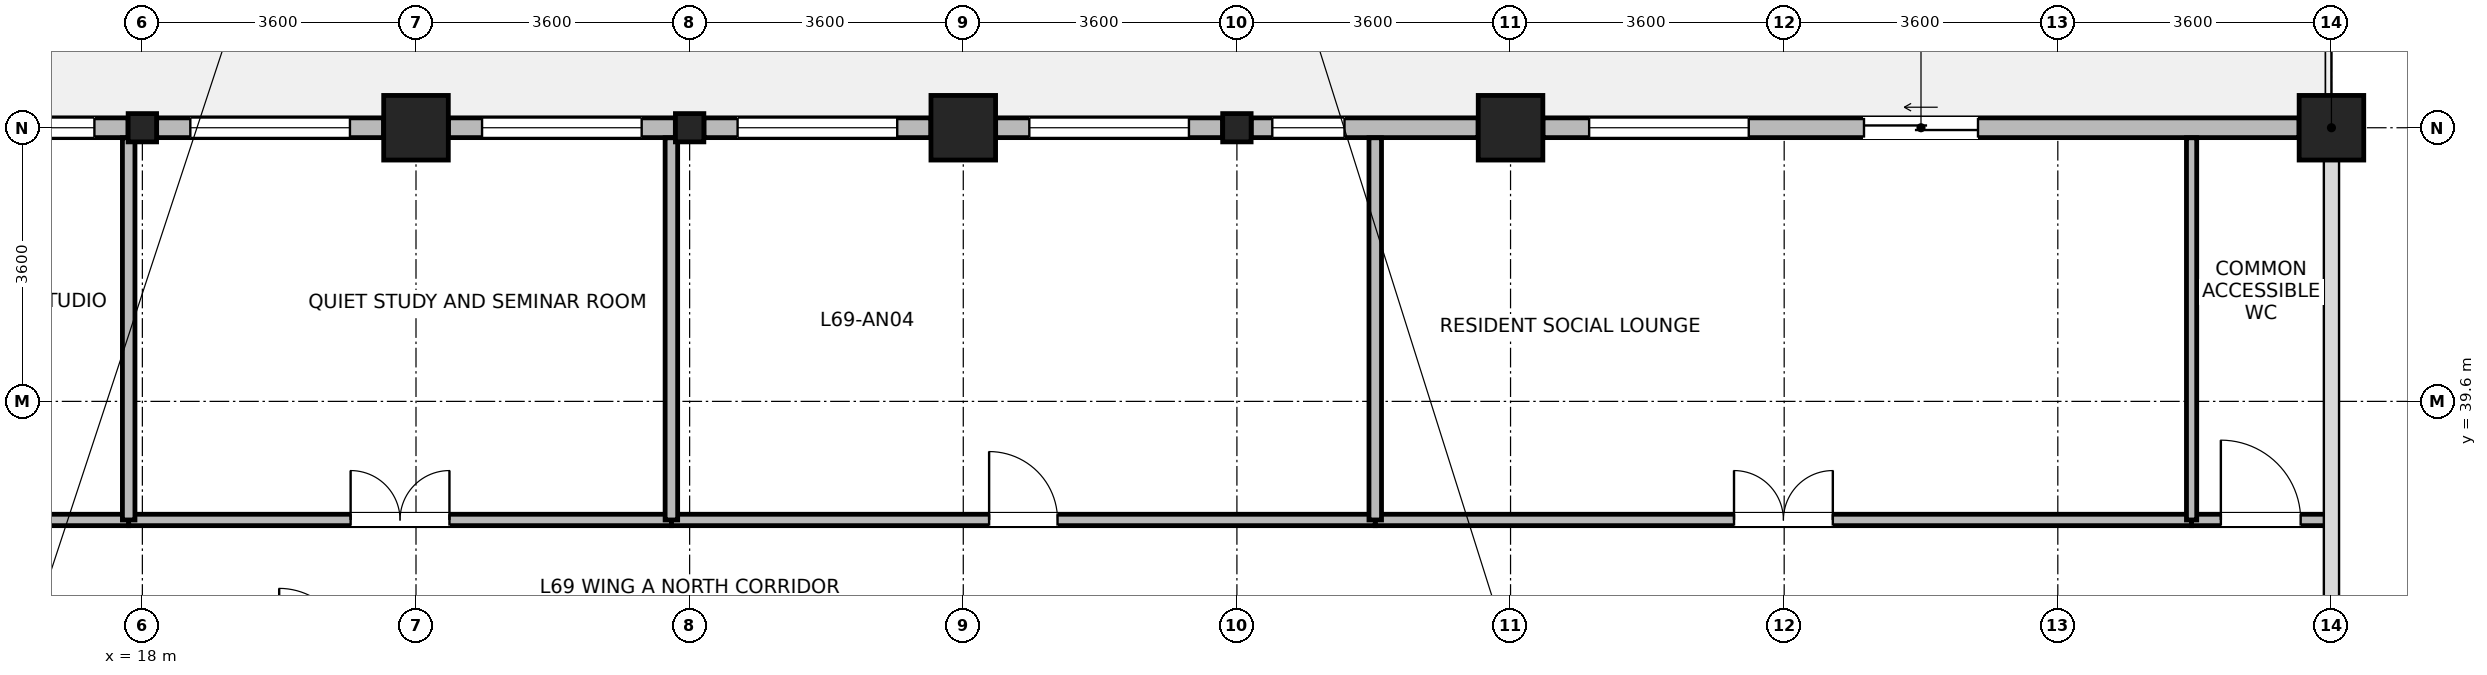
"""IFC4 building model, lengths in metres.
Left out: names, types, materials, properties, quantities, classifications, styles, units other than length and angle.
Written with IfcOpenShell. Run it as: python <this file> out.ifc"""

import sys

from ifc_helpers import new_model, si_unit, direction, frame, frame_2d, origin, origin_2d, place, context, subcontext, project, spatial, rectangle, i_section, extrude, source, transform, mapped, element, fill, save


model = new_model("IFC4")
c1 = context("Model", 3, precision=1e-05, world=origin(), true_north=direction((0.0, 1.0)))
c2 = subcontext(c1, "Body", "Model", "MODEL_VIEW")
j1 = project(units=[si_unit("LENGTHUNIT", "METRE"), si_unit("PLANEANGLEUNIT", "RADIAN")], contexts=[c1])
p1 = place(None, origin())
s1 = spatial("IfcSite", under=j1, at=p1, CompositionType="ELEMENT")
p2 = place(p1, origin())
s2 = spatial("IfcBuilding", under=s1, at=p2, CompositionType="ELEMENT")
p3 = place(p2, frame((0.0, 0.0, 268.4)))
s3 = spatial("IfcBuildingStorey", under=s2, at=p3, CompositionType="ELEMENT", Elevation=268.4)
m1 = source(origin(), c2, "Body", "SweptSolid", [
    extrude(rectangle(XDim=0.85, YDim=0.85, at=origin_2d()), origin(), (0.0, 0.0, 1.0), 3.7),
])
for number, where, z_axis, x_axis in (
    (1, (21.6, 43.2, 0.0), (0.0, 0.0, 1.0), (1.0, 0.0, 0.0)),
    (2, (28.8, 43.2, 0.0), (0.0, 0.0, 1.0), (1.0, 0.0, 0.0)),
    (3, (36.0, 43.2, 0.0), (0.0, 0.0, 1.0), (1.0, 0.0, 0.0)),
    (4, (46.8, 43.2, 0.0), (0.0, 0.0, 1.0), (1.0, 0.0, 0.0)),
):
    element("IfcColumn", number, at=place(p3, frame(where, z_axis=z_axis, x_axis=x_axis)), inside=s3, PredefinedType="COLUMN", context=c2, shape_type="MappedRepresentation", body=[
        mapped(m1, transform((0.0, 0.0, 0.0), x_axis=(1.0, 0.0, 0.0), y_axis=(0.0, 1.0, 0.0), z_axis=(0.0, 0.0, 1.0), scale=1.0)),
    ])
m2 = source(origin(), c2, "Body", "SweptSolid", [
    extrude(i_section(OverallWidth=0.374, OverallDepth=0.372, WebThickness=0.015, FlangeThickness=0.026, FilletRadius=0.015, at=origin_2d()), origin(), (0.0, 0.0, 1.0), 3.7),
])
for number, where, z_axis, x_axis in (
    (5, (18.0, 43.2, 0.0), (0.0, 0.0, 1.0), (1.0, 0.0, 0.0)),
    (6, (25.2, 43.2, 0.0), (0.0, 0.0, 1.0), (1.0, 0.0, 0.0)),
    (7, (32.4, 43.2, 0.0), (0.0, 0.0, 1.0), (1.0, 0.0, 0.0)),
):
    element("IfcColumn", number, at=place(p3, frame(where, z_axis=z_axis, x_axis=x_axis)), inside=s3, PredefinedType="COLUMN", context=c2, shape_type="MappedRepresentation", body=[
        mapped(m2, transform((0.0, 0.0, 0.0), x_axis=(1.0, 0.0, 0.0), y_axis=(0.0, 1.0, 0.0), z_axis=(0.0, 0.0, 1.0), scale=1.0)),
    ])
p4 = place(p3, frame((36.426, 43.2, 0.0), z_axis=(0.0, 0.0, 1.0), x_axis=(1.0, 0.0, 0.0)))
e8 = element("IfcWall", 8, at=p4, inside=s3, PredefinedType="STANDARD", context=c2, shape_type="SweptSolid", body=[
    extrude(rectangle(XDim=9.948, YDim=0.26, at=frame_2d((4.974, 0.0))), origin(), (0.0, 0.0, 1.0), 3.055),
])
p5 = place(p4, frame((4.224, 0.0, 0.0)))
e9 = element("IfcOpeningElement", 9, at=p5, cuts=e8, PredefinedType="OPENING", context=c2, shape_type="SweptSolid", body=[
    extrude(rectangle(XDim=1.5, YDim=2.15, at=frame_2d((0.75, 1.075))), frame((0.0, 0.14, 0.0), z_axis=(0.0, -1.0, 0.0), x_axis=(1.0, 0.0, 0.0)), (0.0, 0.0, 1.0), 0.28),
])
p6 = place(p4, frame((0.608, 0.0, 0.85)))
e10 = element("IfcOpeningElement", 10, at=p6, cuts=e8, PredefinedType="OPENING", context=c2, shape_type="SweptSolid", body=[
    extrude(rectangle(XDim=2.1, YDim=1.95, at=frame_2d((1.05, 0.975))), frame((0.0, 0.14, 0.0), z_axis=(0.0, -1.0, 0.0), x_axis=(1.0, 0.0, 0.0)), (0.0, 0.0, 1.0), 0.28),
])
p7 = place(p3, frame((32.588, 43.2, 0.0), z_axis=(0.0, 0.0, 1.0), x_axis=(1.0, 0.0, 0.0)))
e11 = element("IfcWall", 11, at=p7, inside=s3, PredefinedType="STANDARD", context=c2, shape_type="SweptSolid", body=[
    extrude(rectangle(XDim=2.986, YDim=0.26, at=frame_2d((1.493, 0.0))), origin(), (0.0, 0.0, 1.0), 3.055),
])
p8 = place(p7, frame((0.278, 0.0, 0.85)))
e12 = element("IfcOpeningElement", 12, at=p8, cuts=e11, PredefinedType="OPENING", context=c2, shape_type="SweptSolid", body=[
    extrude(rectangle(XDim=0.95, YDim=1.75, at=frame_2d((0.475, 0.875))), frame((0.0, 0.14, 0.0), z_axis=(0.0, -1.0, 0.0), x_axis=(1.0, 0.0, 0.0)), (0.0, 0.0, 1.0), 0.28),
])
p9 = place(p3, frame((29.226, 43.2, 0.0), z_axis=(0.0, 0.0, 1.0), x_axis=(1.0, 0.0, 0.0)))
e13 = element("IfcWall", 13, at=p9, inside=s3, PredefinedType="STANDARD", context=c2, shape_type="SweptSolid", body=[
    extrude(rectangle(XDim=2.986, YDim=0.26, at=frame_2d((1.493, 0.0))), origin(), (0.0, 0.0, 1.0), 3.055),
])
p10 = place(p9, frame((0.443, 0.0, 0.85)))
e14 = element("IfcOpeningElement", 14, at=p10, cuts=e13, PredefinedType="OPENING", context=c2, shape_type="SweptSolid", body=[
    extrude(rectangle(XDim=2.1, YDim=1.95, at=frame_2d((1.05, 0.975))), frame((0.0, 0.14, 0.0), z_axis=(0.0, -1.0, 0.0), x_axis=(1.0, 0.0, 0.0)), (0.0, 0.0, 1.0), 0.28),
])
p11 = place(p3, frame((25.388, 43.2, 0.0), z_axis=(0.0, 0.0, 1.0), x_axis=(1.0, 0.0, 0.0)))
e15 = element("IfcWall", 15, at=p11, inside=s3, PredefinedType="STANDARD", context=c2, shape_type="SweptSolid", body=[
    extrude(rectangle(XDim=2.986, YDim=0.26, at=frame_2d((1.493, 0.0))), origin(), (0.0, 0.0, 1.0), 3.055),
])
p12 = place(p11, frame((0.443, 0.0, 0.85)))
e16 = element("IfcOpeningElement", 16, at=p12, cuts=e15, PredefinedType="OPENING", context=c2, shape_type="SweptSolid", body=[
    extrude(rectangle(XDim=2.1, YDim=1.95, at=frame_2d((1.05, 0.975))), frame((0.0, 0.14, 0.0), z_axis=(0.0, -1.0, 0.0), x_axis=(1.0, 0.0, 0.0)), (0.0, 0.0, 1.0), 0.28),
])
p13 = place(p3, frame((22.026, 43.2, 0.0), z_axis=(0.0, 0.0, 1.0), x_axis=(1.0, 0.0, 0.0)))
e17 = element("IfcWall", 17, at=p13, inside=s3, PredefinedType="STANDARD", context=c2, shape_type="SweptSolid", body=[
    extrude(rectangle(XDim=2.986, YDim=0.26, at=frame_2d((1.493, 0.0))), origin(), (0.0, 0.0, 1.0), 3.055),
])
p14 = place(p13, frame((0.443, 0.0, 0.85)))
e18 = element("IfcOpeningElement", 18, at=p14, cuts=e17, PredefinedType="OPENING", context=c2, shape_type="SweptSolid", body=[
    extrude(rectangle(XDim=2.1, YDim=1.95, at=frame_2d((1.05, 0.975))), frame((0.0, 0.14, 0.0), z_axis=(0.0, -1.0, 0.0), x_axis=(1.0, 0.0, 0.0)), (0.0, 0.0, 1.0), 0.28),
])
p15 = place(p3, frame((18.188, 43.2, 0.0), z_axis=(0.0, 0.0, 1.0), x_axis=(1.0, 0.0, 0.0)))
e19 = element("IfcWall", 19, at=p15, inside=s3, PredefinedType="STANDARD", context=c2, shape_type="SweptSolid", body=[
    extrude(rectangle(XDim=2.986, YDim=0.26, at=frame_2d((1.493, 0.0))), origin(), (0.0, 0.0, 1.0), 3.055),
])
p16 = place(p15, frame((0.443, 0.0, 0.85)))
e20 = element("IfcOpeningElement", 20, at=p16, cuts=e19, PredefinedType="OPENING", context=c2, shape_type="SweptSolid", body=[
    extrude(rectangle(XDim=2.1, YDim=1.95, at=frame_2d((1.05, 0.975))), frame((0.0, 0.14, 0.0), z_axis=(0.0, -1.0, 0.0), x_axis=(1.0, 0.0, 0.0)), (0.0, 0.0, 1.0), 0.28),
])
p17 = place(p3, frame((14.826, 43.2, 0.0), z_axis=(0.0, 0.0, 1.0), x_axis=(1.0, 0.0, 0.0)))
e21 = element("IfcWall", 21, at=p17, inside=s3, PredefinedType="STANDARD", context=c2, shape_type="SweptSolid", body=[
    extrude(rectangle(XDim=2.986, YDim=0.26, at=frame_2d((1.493, 0.0))), origin(), (0.0, 0.0, 1.0), 3.055),
])
p18 = place(p17, frame((0.443, 0.0, 0.85)))
e22 = element("IfcOpeningElement", 22, at=p18, cuts=e21, PredefinedType="OPENING", context=c2, shape_type="SweptSolid", body=[
    extrude(rectangle(XDim=2.1, YDim=1.95, at=frame_2d((1.05, 0.975))), frame((0.0, 0.14, 0.0), z_axis=(0.0, -1.0, 0.0), x_axis=(1.0, 0.0, 0.0)), (0.0, 0.0, 1.0), 0.28),
])
p19 = place(p3, frame((34.22, 38.04, 0.0), z_axis=(0.0, 0.0, 1.0), x_axis=(1.0, 0.0, 0.0)))
e23 = element("IfcWall", 23, at=p19, inside=s3, PredefinedType="PARTITIONING", context=c2, shape_type="SweptSolid", body=[
    extrude(rectangle(XDim=10.74, YDim=0.15, at=frame_2d((5.37, 0.0))), origin(), (0.0, 0.0, 1.0), 3.455),
])
p20 = place(p19, frame((4.72, 0.0, 0.0)))
e24 = element("IfcOpeningElement", 24, at=p20, cuts=e23, PredefinedType="OPENING", context=c2, shape_type="SweptSolid", body=[
    extrude(rectangle(XDim=1.3, YDim=2.12, at=frame_2d((0.65, 1.06))), frame((0.0, 0.085, 0.0), z_axis=(0.0, -1.0, 0.0), x_axis=(1.0, 0.0, 0.0)), (0.0, 0.0, 1.0), 0.17),
])
p21 = place(p3, frame((24.96, 38.04, 0.0), z_axis=(0.0, 0.0, 1.0), x_axis=(1.0, 0.0, 0.0)))
e25 = element("IfcWall", 25, at=p21, inside=s3, PredefinedType="PARTITIONING", context=c2, shape_type="SweptSolid", body=[
    extrude(rectangle(XDim=9.26, YDim=0.15, at=frame_2d((4.63, 0.0))), origin(), (0.0, 0.0, 1.0), 3.455),
])
p22 = place(p21, frame((4.18, 0.0, 0.0)))
e26 = element("IfcOpeningElement", 26, at=p22, cuts=e25, PredefinedType="OPENING", context=c2, shape_type="SweptSolid", body=[
    extrude(rectangle(XDim=0.9, YDim=2.08, at=frame_2d((0.45, 1.04))), frame((0.0, 0.085, 0.0), z_axis=(0.0, -1.0, 0.0), x_axis=(1.0, 0.0, 0.0)), (0.0, 0.0, 1.0), 0.17),
])
p23 = place(p3, frame((10.12, 38.04, 0.0), z_axis=(0.0, 0.0, 1.0), x_axis=(1.0, 0.0, 0.0)))
e27 = element("IfcWall", 27, at=p23, inside=s3, PredefinedType="PARTITIONING", context=c2, shape_type="SweptSolid", body=[
    extrude(rectangle(XDim=7.7, YDim=0.15, at=frame_2d((3.85, 0.0))), origin(), (0.0, 0.0, 1.0), 3.455),
])
p24 = place(p23, frame((3.325, 0.0, 0.0)))
e28 = element("IfcOpeningElement", 28, at=p24, cuts=e27, PredefinedType="OPENING", context=c2, shape_type="SweptSolid", body=[
    extrude(rectangle(XDim=1.05, YDim=2.12, at=frame_2d((0.525, 1.06))), frame((0.0, 0.085, 0.0), z_axis=(0.0, -1.0, 0.0), x_axis=(1.0, 0.0, 0.0)), (0.0, 0.0, 1.0), 0.17),
])
p25 = place(p3, frame((17.82, 38.04, 0.0), z_axis=(0.0, 0.0, 1.0), x_axis=(1.0, 0.0, 0.0)))
e29 = element("IfcWall", 29, at=p25, inside=s3, PredefinedType="PARTITIONING", context=c2, shape_type="SweptSolid", body=[
    extrude(rectangle(XDim=7.14, YDim=0.15, at=frame_2d((3.57, 0.0))), origin(), (0.0, 0.0, 1.0), 3.455),
])
p26 = place(p25, frame((2.92, 0.0, 0.0)))
e30 = element("IfcOpeningElement", 30, at=p26, cuts=e29, PredefinedType="OPENING", context=c2, shape_type="SweptSolid", body=[
    extrude(rectangle(XDim=1.3, YDim=2.12, at=frame_2d((0.65, 1.06))), frame((0.0, 0.085, 0.0), z_axis=(0.0, -1.0, 0.0), x_axis=(1.0, 0.0, 0.0)), (0.0, 0.0, 1.0), 0.17),
])
p27 = place(p3, frame((44.96, 38.04, 0.0), z_axis=(0.0, 0.0, 1.0), x_axis=(1.0, 0.0, 0.0)))
e31 = element("IfcWall", 31, at=p27, inside=s3, PredefinedType="PARTITIONING", context=c2, shape_type="SweptSolid", body=[
    extrude(rectangle(XDim=1.82, YDim=0.15, at=frame_2d((0.91, 0.0))), origin(), (0.0, 0.0, 1.0), 3.455),
])
p28 = place(p27, frame((0.385, 0.0, 0.0)))
e32 = element("IfcOpeningElement", 32, at=p28, cuts=e31, PredefinedType="OPENING", context=c2, shape_type="SweptSolid", body=[
    extrude(rectangle(XDim=1.05, YDim=2.12, at=frame_2d((0.525, 1.06))), frame((0.0, 0.085, 0.0), z_axis=(0.0, -1.0, 0.0), x_axis=(1.0, 0.0, 0.0)), (0.0, 0.0, 1.0), 0.17),
])
p29 = place(p3, frame((17.82, 38.04, 0.0), z_axis=(0.0, 0.0, 1.0), x_axis=(0.0, 1.0, 0.0)))
e33 = element("IfcWall", 33, at=p29, inside=s3, PredefinedType="PARTITIONING", context=c2, shape_type="SweptSolid", body=[
    extrude(rectangle(XDim=5.028, YDim=0.165, at=frame_2d((2.514, 0.0))), origin(), (0.0, 0.0, 1.0), 3.215),
])
for number, where, z_axis, x_axis in (
    (34, (24.96, 38.04, 0.0), (0.0, 0.0, 1.0), (0.0, 1.0, 0.0)),
    (35, (34.22, 38.04, 0.0), (0.0, 0.0, 1.0), (0.0, 1.0, 0.0)),
):
    element("IfcWall", number, at=place(p3, frame(where, z_axis=z_axis, x_axis=x_axis)), inside=s3, PredefinedType="PARTITIONING", context=c2, shape_type="SweptSolid", body=[
        extrude(rectangle(XDim=5.028, YDim=0.165, at=frame_2d((2.514, 0.0))), origin(), (0.0, 0.0, 1.0), 3.455),
    ])
p30 = place(p3, frame((44.96, 38.04, 0.0), z_axis=(0.0, 0.0, 1.0), x_axis=(0.0, 1.0, 0.0)))
e36 = element("IfcWall", 36, at=p30, inside=s3, PredefinedType="PARTITIONING", context=c2, shape_type="SweptSolid", body=[
    extrude(rectangle(XDim=5.028, YDim=0.135, at=frame_2d((2.514, 0.0))), origin(), (0.0, 0.0, 1.0), 3.455),
])
p31 = place(p5, origin())
e37 = element("IfcDoor", 37, at=p31, inside=s3, OperationType="SLIDING_TO_LEFT", PredefinedType="DOOR", context=c2, shape_type="SweptSolid", body=[
    extrude(rectangle(XDim=1.5, YDim=2.15, at=frame_2d((0.75, 1.075))), frame((0.0, 0.025, 0.0), z_axis=(0.0, -1.0, 0.0), x_axis=(1.0, 0.0, 0.0)), (0.0, 0.0, 1.0), 0.05),
])
fill(e9, e37)
p32 = place(p6, origin())
e38 = element("IfcWindow", 38, at=p32, inside=s3, PartitioningType="SINGLE_PANEL", PredefinedType="WINDOW", context=c2, shape_type="SweptSolid", body=[
    extrude(rectangle(XDim=2.1, YDim=1.95, at=frame_2d((1.05, 0.975))), frame((0.0, 0.03, 0.0), z_axis=(0.0, -1.0, 0.0), x_axis=(1.0, 0.0, 0.0)), (0.0, 0.0, 1.0), 0.06),
])
fill(e10, e38)
p33 = place(p8, origin())
e39 = element("IfcWindow", 39, at=p33, inside=s3, PartitioningType="SINGLE_PANEL", PredefinedType="WINDOW", context=c2, shape_type="SweptSolid", body=[
    extrude(rectangle(XDim=0.95, YDim=1.75, at=frame_2d((0.475, 0.875))), frame((0.0, 0.03, 0.0), z_axis=(0.0, -1.0, 0.0), x_axis=(1.0, 0.0, 0.0)), (0.0, 0.0, 1.0), 0.06),
])
fill(e12, e39)
p34 = place(p10, origin())
e40 = element("IfcWindow", 40, at=p34, inside=s3, PartitioningType="SINGLE_PANEL", PredefinedType="WINDOW", context=c2, shape_type="SweptSolid", body=[
    extrude(rectangle(XDim=2.1, YDim=1.95, at=frame_2d((1.05, 0.975))), frame((0.0, 0.03, 0.0), z_axis=(0.0, -1.0, 0.0), x_axis=(1.0, 0.0, 0.0)), (0.0, 0.0, 1.0), 0.06),
])
fill(e14, e40)
p35 = place(p12, origin())
e41 = element("IfcWindow", 41, at=p35, inside=s3, PartitioningType="SINGLE_PANEL", PredefinedType="WINDOW", context=c2, shape_type="SweptSolid", body=[
    extrude(rectangle(XDim=2.1, YDim=1.95, at=frame_2d((1.05, 0.975))), frame((0.0, 0.03, 0.0), z_axis=(0.0, -1.0, 0.0), x_axis=(1.0, 0.0, 0.0)), (0.0, 0.0, 1.0), 0.06),
])
fill(e16, e41)
p36 = place(p14, origin())
e42 = element("IfcWindow", 42, at=p36, inside=s3, PartitioningType="SINGLE_PANEL", PredefinedType="WINDOW", context=c2, shape_type="SweptSolid", body=[
    extrude(rectangle(XDim=2.1, YDim=1.95, at=frame_2d((1.05, 0.975))), frame((0.0, 0.03, 0.0), z_axis=(0.0, -1.0, 0.0), x_axis=(1.0, 0.0, 0.0)), (0.0, 0.0, 1.0), 0.06),
])
fill(e18, e42)
p37 = place(p16, origin())
e43 = element("IfcWindow", 43, at=p37, inside=s3, PartitioningType="SINGLE_PANEL", PredefinedType="WINDOW", context=c2, shape_type="SweptSolid", body=[
    extrude(rectangle(XDim=2.1, YDim=1.95, at=frame_2d((1.05, 0.975))), frame((0.0, 0.03, 0.0), z_axis=(0.0, -1.0, 0.0), x_axis=(1.0, 0.0, 0.0)), (0.0, 0.0, 1.0), 0.06),
])
fill(e20, e43)
p38 = place(p18, origin())
e44 = element("IfcWindow", 44, at=p38, inside=s3, PartitioningType="SINGLE_PANEL", PredefinedType="WINDOW", context=c2, shape_type="SweptSolid", body=[
    extrude(rectangle(XDim=2.1, YDim=1.95, at=frame_2d((1.05, 0.975))), frame((0.0, 0.03, 0.0), z_axis=(0.0, -1.0, 0.0), x_axis=(1.0, 0.0, 0.0)), (0.0, 0.0, 1.0), 0.06),
])
fill(e22, e44)
p39 = place(p20, origin())
e45 = element("IfcDoor", 45, at=p39, inside=s3, OperationType="DOUBLE_DOOR_SINGLE_SWING", PredefinedType="DOOR", context=c2, shape_type="SweptSolid", body=[
    extrude(rectangle(XDim=1.3, YDim=2.12, at=frame_2d((0.65, 1.06))), frame((0.0, 0.025, 0.0), z_axis=(0.0, -1.0, 0.0), x_axis=(1.0, 0.0, 0.0)), (0.0, 0.0, 1.0), 0.05),
])
fill(e24, e45)
p40 = place(p22, origin())
e46 = element("IfcDoor", 46, at=p40, inside=s3, OperationType="SINGLE_SWING_LEFT", PredefinedType="DOOR", context=c2, shape_type="SweptSolid", body=[
    extrude(rectangle(XDim=0.9, YDim=2.08, at=frame_2d((0.45, 1.04))), frame((0.0, 0.025, 0.0), z_axis=(0.0, -1.0, 0.0), x_axis=(1.0, 0.0, 0.0)), (0.0, 0.0, 1.0), 0.05),
])
fill(e26, e46)
p41 = place(p26, origin())
e47 = element("IfcDoor", 47, at=p41, inside=s3, OperationType="DOUBLE_DOOR_SINGLE_SWING", PredefinedType="DOOR", context=c2, shape_type="SweptSolid", body=[
    extrude(rectangle(XDim=1.3, YDim=2.12, at=frame_2d((0.65, 1.06))), frame((0.0, 0.025, 0.0), z_axis=(0.0, -1.0, 0.0), x_axis=(1.0, 0.0, 0.0)), (0.0, 0.0, 1.0), 0.05),
])
fill(e30, e47)
p42 = place(p28, origin())
e48 = element("IfcDoor", 48, at=p42, inside=s3, OperationType="SINGLE_SWING_LEFT", PredefinedType="DOOR", context=c2, shape_type="SweptSolid", body=[
    extrude(rectangle(XDim=1.05, YDim=2.12, at=frame_2d((0.525, 1.06))), frame((0.0, 0.025, 0.0), z_axis=(0.0, -1.0, 0.0), x_axis=(1.0, 0.0, 0.0)), (0.0, 0.0, 1.0), 0.05),
])
fill(e32, e48)
save(model, sys.argv[1])
